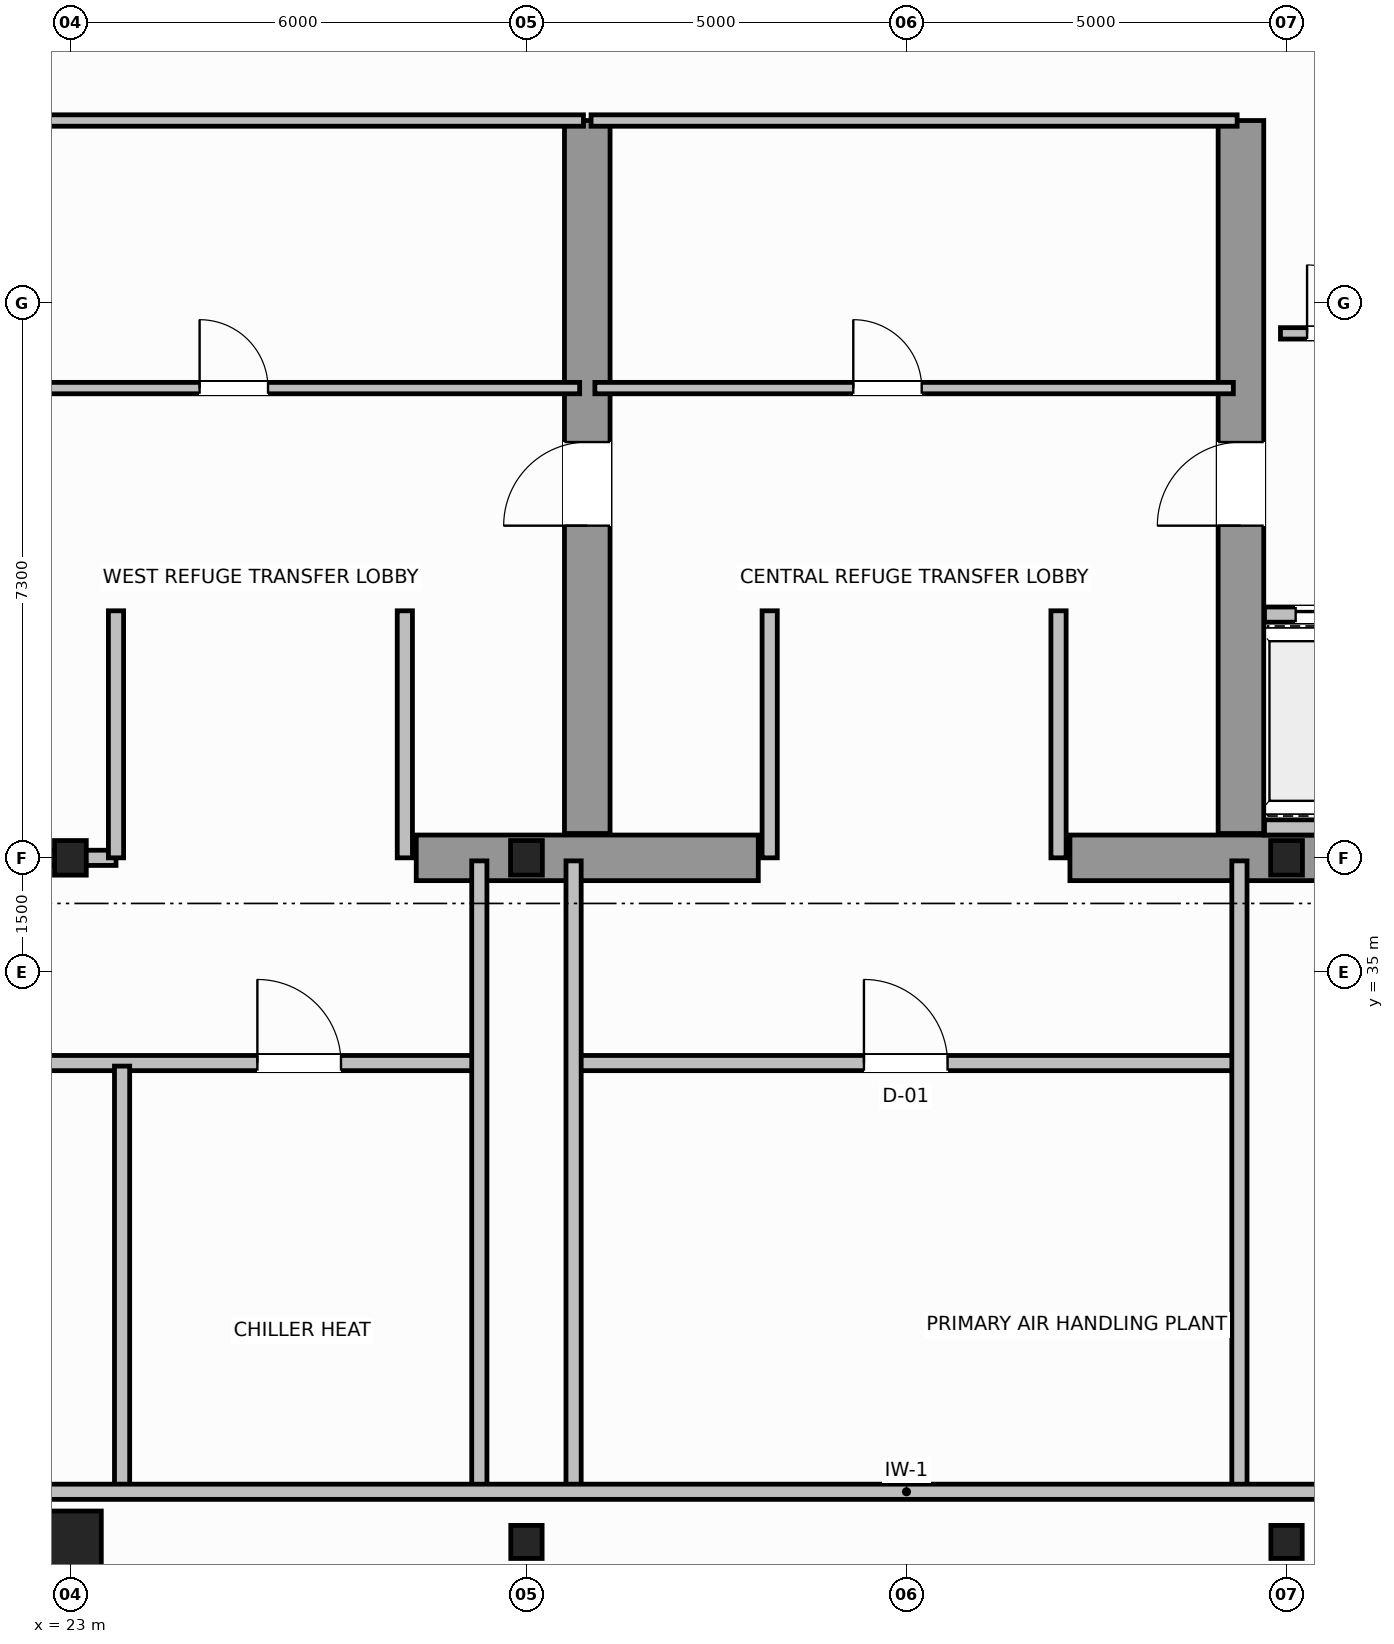
"""IFC4 building model, lengths in metres.
Left out: names, types, materials, properties, quantities, classifications, styles, units other than length and angle.
Written with IfcOpenShell. Run it as: python <this file> out.ifc"""

import sys

from ifc_helpers import new_model, si_unit, direction, frame, frame_2d, origin, origin_2d, place, context, subcontext, project, spatial, rectangle, hollow_circle, i_section, extrude, source, transform, mapped, element, fill, save


model = new_model("IFC4")
c1 = context("Model", 3, precision=1e-05, world=origin(), true_north=direction((0.0, 1.0)))
c2 = subcontext(c1, "Body", "Model", "MODEL_VIEW")
j1 = project(units=[si_unit("LENGTHUNIT", "METRE"), si_unit("PLANEANGLEUNIT", "RADIAN")], contexts=[c1])
p1 = place(None, origin())
s1 = spatial("IfcSite", under=j1, at=p1, CompositionType="ELEMENT")
p2 = place(p1, origin())
s2 = spatial("IfcBuilding", under=s1, at=p2, CompositionType="ELEMENT")
p3 = place(p2, frame((0.0, 0.0, 218.4)))
s3 = spatial("IfcBuildingStorey", under=s2, at=p3, CompositionType="ELEMENT", Elevation=218.4)
m1 = source(origin(), c2, "Body", "SweptSolid", [
    extrude(i_section(OverallWidth=0.418, OverallDepth=0.455, WebThickness=0.042, FlangeThickness=0.058, FilletRadius=0.015, at=origin_2d()), origin(), (0.0, 0.0, 1.0), 4.8),
])
for number, where, z_axis, x_axis in (
    (1, (23.0, 36.5, 0.0), (0.0, 0.0, 1.0), (1.0, 0.0, 0.0)),
    (2, (29.0, 36.5, 0.0), (0.0, 0.0, 1.0), (1.0, 0.0, 0.0)),
    (3, (39.0, 36.5, 0.0), (0.0, 0.0, 1.0), (1.0, 0.0, 0.0)),
):
    element("IfcColumn", number, at=place(p3, frame(where, z_axis=z_axis, x_axis=x_axis)), inside=s3, PredefinedType="COLUMN", context=c2, shape_type="MappedRepresentation", body=[
        mapped(m1, transform((0.0, 0.0, 0.0), scale=1.0)),
    ])
m2 = source(origin(), c2, "Body", "SweptSolid", [
    extrude(hollow_circle(Radius=0.406, WallThickness=0.04, at=origin_2d()), origin(), (0.0, 0.0, 1.0), 4.8),
])
p4 = place(p3, frame((23.0, 27.5, 0.0), z_axis=(0.0, 0.0, 1.0), x_axis=(1.0, 0.0, 0.0)))
e4 = element("IfcColumn", 4, at=p4, inside=s3, PredefinedType="COLUMN", context=c2, shape_type="MappedRepresentation", body=[
    mapped(m2, transform((0.0, 0.0, 0.0), scale=1.0)),
])
m3 = source(origin(), c2, "Body", "SweptSolid", [
    extrude(i_section(OverallWidth=0.412, OverallDepth=0.435, WebThickness=0.036, FlangeThickness=0.05, FilletRadius=0.015, at=origin_2d()), origin(), (0.0, 0.0, 1.0), 4.8),
])
for number, where, z_axis, x_axis in (
    (5, (29.0, 27.5, 0.0), (0.0, 0.0, 1.0), (1.0, 0.0, 0.0)),
    (6, (39.0, 27.5, 0.0), (0.0, 0.0, 1.0), (1.0, 0.0, 0.0)),
):
    element("IfcColumn", number, at=place(p3, frame(where, z_axis=z_axis, x_axis=x_axis)), inside=s3, PredefinedType="COLUMN", context=c2, shape_type="MappedRepresentation", body=[
        mapped(m3, transform((0.0, 0.0, 0.0), scale=1.0)),
    ])
for number, where, z_axis, x_axis in (
    (7, (27.55, 36.5, 0.0), (0.0, 0.0, 1.0), (1.0, 0.0, 0.0)),
    (8, (36.15, 36.5, 0.0), (0.0, 0.0, 1.0), (1.0, 0.0, 0.0)),
):
    element("IfcWall", number, at=place(p3, frame(where, z_axis=z_axis, x_axis=x_axis)), inside=s3, PredefinedType="SHEAR", context=c2, shape_type="SweptSolid", body=[
        extrude(rectangle(XDim=4.5, YDim=0.6, at=frame_2d((2.25, 0.0))), origin(), (0.0, 0.0, 1.0), 4.8),
    ])
p5 = place(p3, frame((29.8, 36.82, 0.0), z_axis=(0.0, 0.0, 1.0), x_axis=(0.0, 1.0, 0.0)))
e9 = element("IfcWall", 9, at=p5, inside=s3, PredefinedType="SHEAR", context=c2, shape_type="SweptSolid", body=[
    extrude(rectangle(XDim=9.38, YDim=0.6, at=frame_2d((4.69, 0.0))), origin(), (0.0, 0.0, 1.0), 4.8),
])
p6 = place(p5, frame((4.05, 0.0, 0.0)))
e10 = element("IfcOpeningElement", 10, at=p6, cuts=e9, PredefinedType="OPENING", context=c2, shape_type="SweptSolid", body=[
    extrude(rectangle(XDim=1.1, YDim=2.15, at=frame_2d((0.55, 1.075))), frame((0.0, 0.31, 0.0), z_axis=(0.0, -1.0, 0.0), x_axis=(1.0, 0.0, 0.0)), (0.0, 0.0, 1.0), 0.62),
])
p7 = place(p3, frame((38.4, 36.82, 0.0), z_axis=(0.0, 0.0, 1.0), x_axis=(0.0, 1.0, 0.0)))
e11 = element("IfcWall", 11, at=p7, inside=s3, PredefinedType="SHEAR", context=c2, shape_type="SweptSolid", body=[
    extrude(rectangle(XDim=9.38, YDim=0.6, at=frame_2d((4.69, 0.0))), origin(), (0.0, 0.0, 1.0), 4.8),
])
p8 = place(p7, frame((4.05, 0.0, 0.0)))
e12 = element("IfcOpeningElement", 12, at=p8, cuts=e11, PredefinedType="OPENING", context=c2, shape_type="SweptSolid", body=[
    extrude(rectangle(XDim=1.1, YDim=2.15, at=frame_2d((0.55, 1.075))), frame((0.0, 0.31, 0.0), z_axis=(0.0, -1.0, 0.0), x_axis=(1.0, 0.0, 0.0)), (0.0, 0.0, 1.0), 0.62),
])
p9 = place(p3, frame((38.71, 39.7, 0.0), z_axis=(0.0, 0.0, 1.0), x_axis=(1.0, 0.0, 0.0)))
e13 = element("IfcWall", 13, at=p9, inside=s3, PredefinedType="SOLIDWALL", context=c2, shape_type="SweptSolid", body=[
    extrude(rectangle(XDim=1.92, YDim=0.2, at=frame_2d((0.96, 0.0))), origin(), (0.0, 0.0, 1.0), 4.54),
])
p10 = place(p9, frame((0.41, 0.0, 0.0)))
e14 = element("IfcOpeningElement", 14, at=p10, cuts=e13, PredefinedType="OPENING", context=c2, shape_type="SweptSolid", body=[
    extrude(rectangle(XDim=1.1, YDim=2.15, at=frame_2d((0.55, 1.075))), frame((0.0, 0.11, 0.0), z_axis=(0.0, -1.0, 0.0), x_axis=(1.0, 0.0, 0.0)), (0.0, 0.0, 1.0), 0.22),
])
p11 = place(p3, frame((38.71, 36.9, 0.0), z_axis=(0.0, 0.0, 1.0), x_axis=(1.0, 0.0, 0.0)))
e15 = element("IfcWall", 15, at=p11, inside=s3, PredefinedType="SOLIDWALL", context=c2, shape_type="SweptSolid", body=[
    extrude(rectangle(XDim=1.92, YDim=0.2, at=frame_2d((0.96, 0.0))), origin(), (0.0, 0.0, 1.0), 4.54),
])
p12 = place(p3, frame((21.25, 36.5, 0.0), z_axis=(0.0, 0.0, 1.0), x_axis=(1.0, 0.0, 0.0)))
e16 = element("IfcWall", 16, at=p12, inside=s3, PredefinedType="SOLIDWALL", context=c2, shape_type="SweptSolid", body=[
    extrude(rectangle(XDim=2.35, YDim=0.2, at=frame_2d((1.175, 0.0))), origin(), (0.0, 0.0, 1.0), 3.53),
])
for number, where, z_axis, x_axis in (
    (17, (23.6, 36.5, 0.0), (0.0, 0.0, 1.0), (0.0, 1.0, 0.0)),
    (18, (27.4, 36.5, 0.0), (0.0, 0.0, 1.0), (0.0, 1.0, 0.0)),
):
    element("IfcWall", number, at=place(p3, frame(where, z_axis=z_axis, x_axis=x_axis)), inside=s3, PredefinedType="SOLIDWALL", context=c2, shape_type="SweptSolid", body=[
        extrude(rectangle(XDim=3.25, YDim=0.2, at=frame_2d((1.625, 0.0))), origin(), (0.0, 0.0, 1.0), 4.54),
    ])
p13 = place(p3, frame((21.25, 46.2, 0.0), z_axis=(0.0, 0.0, 1.0), x_axis=(1.0, 0.0, 0.0)))
e19 = element("IfcWall", 19, at=p13, inside=s3, PredefinedType="PARTITIONING", context=c2, shape_type="SweptSolid", body=[
    extrude(rectangle(XDim=8.5, YDim=0.15, at=frame_2d((4.25, 0.0))), origin(), (0.0, 0.0, 1.0), 4.54),
])
p14 = place(p3, frame((21.3, 42.68, 0.0), z_axis=(0.0, 0.0, 1.0), x_axis=(1.0, 0.0, 0.0)))
e20 = element("IfcWall", 20, at=p14, inside=s3, PredefinedType="PARTITIONING", context=c2, shape_type="SweptSolid", body=[
    extrude(rectangle(XDim=8.4, YDim=0.15, at=frame_2d((4.2, 0.0))), origin(), (0.0, 0.0, 1.0), 4.54),
])
p15 = place(p14, frame((3.4, 0.0, 0.0)))
e21 = element("IfcOpeningElement", 21, at=p15, cuts=e20, PredefinedType="OPENING", context=c2, shape_type="SweptSolid", body=[
    extrude(rectangle(XDim=0.9, YDim=2.1, at=frame_2d((0.45, 1.05))), frame((0.0, 0.085, 0.0), z_axis=(0.0, -1.0, 0.0), x_axis=(1.0, 0.0, 0.0)), (0.0, 0.0, 1.0), 0.17),
])
for number, where, z_axis, x_axis in (
    (22, (32.2, 36.5, 0.0), (0.0, 0.0, 1.0), (0.0, 1.0, 0.0)),
    (23, (36.0, 36.5, 0.0), (0.0, 0.0, 1.0), (0.0, 1.0, 0.0)),
):
    element("IfcWall", number, at=place(p3, frame(where, z_axis=z_axis, x_axis=x_axis)), inside=s3, PredefinedType="SOLIDWALL", context=c2, shape_type="SweptSolid", body=[
        extrude(rectangle(XDim=3.25, YDim=0.2, at=frame_2d((1.625, 0.0))), origin(), (0.0, 0.0, 1.0), 4.54),
    ])
p16 = place(p3, frame((29.85, 46.2, 0.0), z_axis=(0.0, 0.0, 1.0), x_axis=(1.0, 0.0, 0.0)))
e24 = element("IfcWall", 24, at=p16, inside=s3, PredefinedType="PARTITIONING", context=c2, shape_type="SweptSolid", body=[
    extrude(rectangle(XDim=8.5, YDim=0.15, at=frame_2d((4.25, 0.0))), origin(), (0.0, 0.0, 1.0), 4.54),
])
p17 = place(p3, frame((29.9, 42.68, 0.0), z_axis=(0.0, 0.0, 1.0), x_axis=(1.0, 0.0, 0.0)))
e25 = element("IfcWall", 25, at=p17, inside=s3, PredefinedType="PARTITIONING", context=c2, shape_type="SweptSolid", body=[
    extrude(rectangle(XDim=8.4, YDim=0.15, at=frame_2d((4.2, 0.0))), origin(), (0.0, 0.0, 1.0), 4.54),
])
p18 = place(p17, frame((3.4, 0.0, 0.0)))
e26 = element("IfcOpeningElement", 26, at=p18, cuts=e25, PredefinedType="OPENING", context=c2, shape_type="SweptSolid", body=[
    extrude(rectangle(XDim=0.9, YDim=2.1, at=frame_2d((0.45, 1.05))), frame((0.0, 0.085, 0.0), z_axis=(0.0, -1.0, 0.0), x_axis=(1.0, 0.0, 0.0)), (0.0, 0.0, 1.0), 0.17),
])
p19 = place(p3, frame((38.92, 43.4, 0.0), z_axis=(0.0, 0.0, 1.0), x_axis=(1.0, 0.0, 0.0)))
e27 = element("IfcWall", 27, at=p19, inside=s3, PredefinedType="PARTITIONING", context=c2, shape_type="SweptSolid", body=[
    extrude(rectangle(XDim=1.6, YDim=0.15, at=frame_2d((0.8, 0.0))), origin(), (0.0, 0.0, 1.0), 4.54),
])
p20 = place(p19, frame((0.35, 0.0, 0.0)))
e28 = element("IfcOpeningElement", 28, at=p20, cuts=e27, PredefinedType="OPENING", context=c2, shape_type="SweptSolid", body=[
    extrude(rectangle(XDim=0.9, YDim=2.1, at=frame_2d((0.45, 1.05))), frame((0.0, 0.085, 0.0), z_axis=(0.0, -1.0, 0.0), x_axis=(1.0, 0.0, 0.0)), (0.0, 0.0, 1.0), 0.17),
])
p21 = place(p3, frame((17.45, 33.8, 0.0), z_axis=(0.0, 0.0, 1.0), x_axis=(1.0, 0.0, 0.0)))
e29 = element("IfcWall", 29, at=p21, inside=s3, PredefinedType="SOLIDWALL", context=c2, shape_type="SweptSolid", body=[
    extrude(rectangle(XDim=10.91, YDim=0.2, at=frame_2d((5.455, 0.0))), origin(), (0.0, 0.0, 1.0), 4.13),
])
p22 = place(p21, frame((8.01, 0.0, 0.0)))
e30 = element("IfcOpeningElement", 30, at=p22, cuts=e29, PredefinedType="OPENING", context=c2, shape_type="SweptSolid", body=[
    extrude(rectangle(XDim=1.1, YDim=2.15, at=frame_2d((0.55, 1.075))), frame((0.0, 0.11, 0.0), z_axis=(0.0, -1.0, 0.0), x_axis=(1.0, 0.0, 0.0)), (0.0, 0.0, 1.0), 0.22),
])
p23 = place(p3, frame((29.64, 33.8, 0.0), z_axis=(0.0, 0.0, 1.0), x_axis=(1.0, 0.0, 0.0)))
e31 = element("IfcWall", 31, at=p23, inside=s3, PredefinedType="SOLIDWALL", context=c2, shape_type="SweptSolid", body=[
    extrude(rectangle(XDim=8.72, YDim=0.2, at=frame_2d((4.36, 0.0))), origin(), (0.0, 0.0, 1.0), 4.13),
])
p24 = place(p23, frame((3.8, 0.0, 0.0)))
e32 = element("IfcOpeningElement", 32, at=p24, cuts=e31, PredefinedType="OPENING", context=c2, shape_type="SweptSolid", body=[
    extrude(rectangle(XDim=1.1, YDim=2.15, at=frame_2d((0.55, 1.075))), frame((0.0, 0.11, 0.0), z_axis=(0.0, -1.0, 0.0), x_axis=(1.0, 0.0, 0.0)), (0.0, 0.0, 1.0), 0.22),
])
for number, where, z_axis, x_axis in (
    (33, (28.38, 28.16, 0.0), (0.0, 0.0, 1.0), (0.0, 1.0, 0.0)),
    (34, (29.62, 28.16, 0.0), (0.0, 0.0, 1.0), (0.0, 1.0, 0.0)),
    (35, (38.38, 28.16, 0.0), (0.0, 0.0, 1.0), (0.0, 1.0, 0.0)),
):
    element("IfcWall", number, at=place(p3, frame(where, z_axis=z_axis, x_axis=x_axis)), inside=s3, PredefinedType="SOLIDWALL", context=c2, shape_type="SweptSolid", body=[
        extrude(rectangle(XDim=8.3, YDim=0.2, at=frame_2d((4.15, 0.0))), origin(), (0.0, 0.0, 1.0), 4.54),
    ])
p25 = place(p3, frame((23.68, 28.16, 0.0), z_axis=(0.0, 0.0, 1.0), x_axis=(0.0, 1.0, 0.0)))
e36 = element("IfcWall", 36, at=p25, inside=s3, PredefinedType="SOLIDWALL", context=c2, shape_type="SweptSolid", body=[
    extrude(rectangle(XDim=5.6, YDim=0.2, at=frame_2d((2.8, 0.0))), origin(), (0.0, 0.0, 1.0), 4.54),
])
p26 = place(p3, frame((17.48, 28.16, 0.0), z_axis=(0.0, 0.0, 1.0), x_axis=(1.0, 0.0, 0.0)))
e37 = element("IfcWall", 37, at=p26, inside=s3, PredefinedType="SOLIDWALL", context=c2, shape_type="SweptSolid", body=[
    extrude(rectangle(XDim=33.04, YDim=0.2, at=frame_2d((16.52, 0.0))), origin(), (0.0, 0.0, 1.0), 4.54),
])
m4 = source(origin(), c2, "Body", "SweptSolid", [
    extrude(rectangle(XDim=1.1, YDim=2.15, at=frame_2d((0.55, 1.075))), frame((0.0, 0.025, 0.0), z_axis=(0.0, -1.0, 0.0), x_axis=(1.0, 0.0, 0.0)), (0.0, 0.0, 1.0), 0.05),
])
p27 = place(p10, origin())
e38 = element("IfcDoor", 38, at=p27, inside=s3, OperationType="DOUBLE_DOOR_SLIDING", PredefinedType="DOOR", context=c2, shape_type="MappedRepresentation", body=[
    mapped(m4, transform((0.0, 0.0, 0.0), scale=1.0)),
])
fill(e14, e38)
m5 = source(origin(), c2, "Body", "SweptSolid", [
    extrude(rectangle(XDim=0.9, YDim=2.1, at=frame_2d((0.45, 1.05))), frame((0.0, 0.025, 0.0), z_axis=(0.0, -1.0, 0.0), x_axis=(1.0, 0.0, 0.0)), (0.0, 0.0, 1.0), 0.05),
])
p28 = place(p15, origin())
e39 = element("IfcDoor", 39, at=p28, inside=s3, OperationType="SINGLE_SWING_RIGHT", PredefinedType="DOOR", context=c2, shape_type="MappedRepresentation", body=[
    mapped(m5, transform((0.0, 0.0, 0.0), scale=1.0)),
])
fill(e21, e39)
p29 = place(p18, origin())
e40 = element("IfcDoor", 40, at=p29, inside=s3, OperationType="SINGLE_SWING_RIGHT", PredefinedType="DOOR", context=c2, shape_type="MappedRepresentation", body=[
    mapped(m5, transform((0.0, 0.0, 0.0), scale=1.0)),
])
fill(e26, e40)
p30 = place(p6, origin())
e41 = element("IfcDoor", 41, at=p30, inside=s3, OperationType="SINGLE_SWING_LEFT", PredefinedType="DOOR", context=c2, shape_type="MappedRepresentation", body=[
    mapped(m4, transform((0.0, 0.0, 0.0), scale=1.0)),
])
fill(e10, e41)
p31 = place(p8, origin())
e42 = element("IfcDoor", 42, at=p31, inside=s3, OperationType="SINGLE_SWING_RIGHT", PredefinedType="DOOR", context=c2, shape_type="MappedRepresentation", body=[
    mapped(m4, transform((0.0, 0.0, 0.0), scale=1.0)),
])
fill(e12, e42)
p32 = place(p20, origin())
e43 = element("IfcDoor", 43, at=p32, inside=s3, OperationType="SINGLE_SWING_LEFT", PredefinedType="DOOR", context=c2, shape_type="MappedRepresentation", body=[
    mapped(m5, transform((0.0, 0.0, 0.0), scale=1.0)),
])
fill(e28, e43)
p33 = place(p22, origin())
e44 = element("IfcDoor", 44, at=p33, inside=s3, OperationType="SINGLE_SWING_LEFT", PredefinedType="DOOR", context=c2, shape_type="MappedRepresentation", body=[
    mapped(m4, transform((0.0, 0.0, 0.0), scale=1.0)),
])
fill(e30, e44)
p34 = place(p24, origin())
e45 = element("IfcDoor", 45, at=p34, inside=s3, OperationType="SINGLE_SWING_RIGHT", PredefinedType="DOOR", context=c2, shape_type="MappedRepresentation", body=[
    mapped(m4, transform((0.0, 0.0, 0.0), scale=1.0)),
])
fill(e32, e45)
save(model, sys.argv[1])
